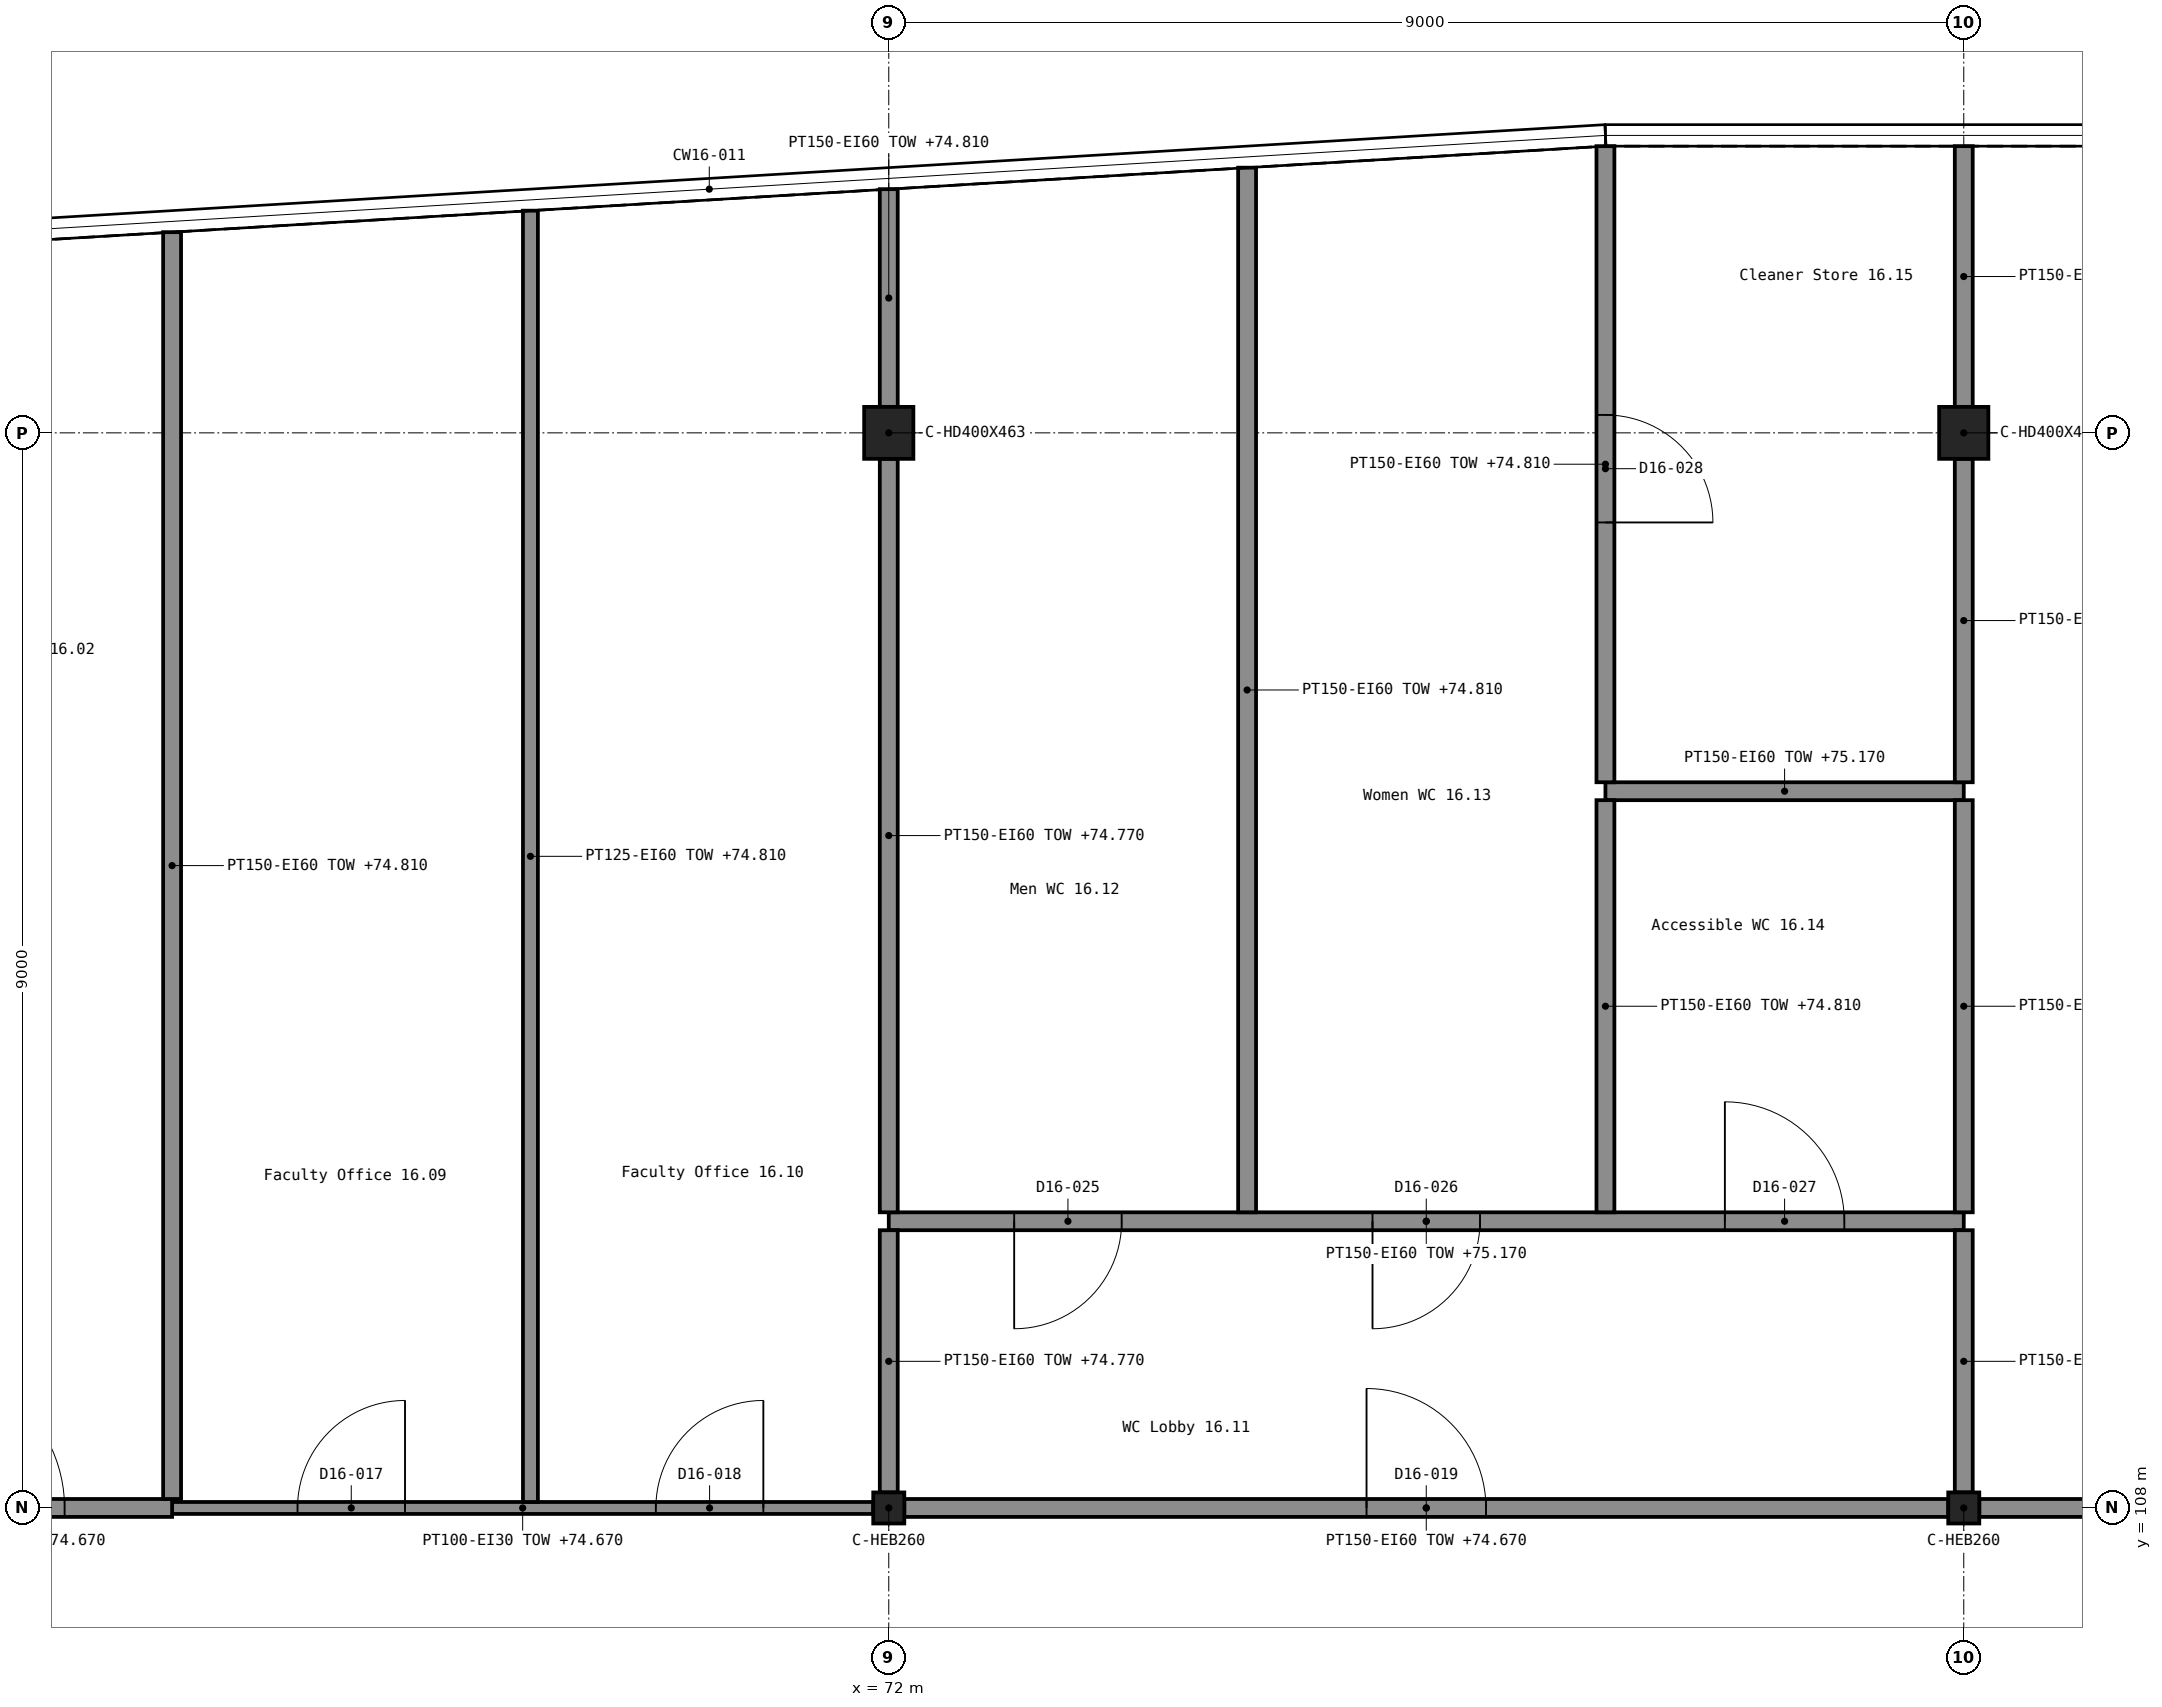
"""IFC4 building model, lengths in metres.
Left out: names, types, materials, properties, quantities, classifications, styles, units other than length and angle.
Written with IfcOpenShell. Run it as: python <this file> out.ifc"""

import sys

from ifc_helpers import new_model, si_unit, direction, frame, frame_2d, origin, origin_2d, place, context, subcontext, project, spatial, rectangle, i_section, extrude, element, fill, save


model = new_model("IFC4")
c1 = context("Model", 3, precision=1e-05, world=origin(), true_north=direction((0.0, 1.0)))
c2 = subcontext(c1, "Body", "Model", "MODEL_VIEW")
j1 = project(units=[si_unit("LENGTHUNIT", "METRE"), si_unit("PLANEANGLEUNIT", "RADIAN")], contexts=[c1])
p1 = place(None, origin())
s1 = spatial("IfcSite", under=j1, at=p1, CompositionType="ELEMENT")
p2 = place(p1, origin())
s2 = spatial("IfcBuilding", under=s1, at=p2, CompositionType="ELEMENT")
p3 = place(p2, frame((0.0, 0.0, 71.4)))
s3 = spatial("IfcBuildingStorey", under=s2, at=p3, CompositionType="ELEMENT", Elevation=71.4)
for number, where, z_axis, x_axis in (
    (1, (72.0, 108.0, 0.0), (0.0, 0.0, 1.0), (1.0, 0.0, 0.0)),
    (2, (81.0, 108.0, 0.0), (0.0, 0.0, 1.0), (1.0, 0.0, 0.0)),
):
    element("IfcColumn", number, at=place(p3, frame(where, z_axis=z_axis, x_axis=x_axis)), inside=s3, PredefinedType="COLUMN", context=c2, shape_type="SweptSolid", body=[
        extrude(i_section(OverallWidth=0.26, OverallDepth=0.26, WebThickness=0.01, FlangeThickness=0.018, FilletRadius=0.024, at=origin_2d()), origin(), (0.0, 0.0, 1.0), 3.9),
    ])
for number, where, z_axis, x_axis in (
    (3, (72.0, 117.0, 0.0), (0.0, 0.0, 1.0), (1.0, 0.0, 0.0)),
    (4, (81.0, 117.0, 0.0), (0.0, 0.0, 1.0), (1.0, 0.0, 0.0)),
):
    element("IfcColumn", number, at=place(p3, frame(where, z_axis=z_axis, x_axis=x_axis)), inside=s3, PredefinedType="COLUMN", context=c2, shape_type="SweptSolid", body=[
        extrude(i_section(OverallWidth=0.412, OverallDepth=0.435, WebThickness=0.036, FlangeThickness=0.057, FilletRadius=0.015, at=origin_2d()), origin(), (0.0, 0.0, 1.0), 3.9),
    ])
p4 = place(p3, frame((66.0, 108.0, 0.0), z_axis=(0.0, 0.0, 1.0), x_axis=(1.0, 0.0, 0.0)))
e5 = element("IfcWall", 5, at=p4, inside=s3, PredefinedType="PARTITIONING", context=c2, shape_type="SweptSolid", body=[
    extrude(rectangle(XDim=5.87, YDim=0.1, at=frame_2d((2.935, 0.0))), origin(), (0.0, 0.0, 1.0), 3.27),
])
p5 = place(p4, frame((1.05, 0.0, 0.0)))
e6 = element("IfcOpeningElement", 6, at=p5, cuts=e5, PredefinedType="OPENING", context=c2, shape_type="SweptSolid", body=[
    extrude(rectangle(XDim=0.9, YDim=2.1, at=frame_2d((0.45, 1.05))), frame((0.0, 0.061, 0.0), z_axis=(0.0, -1.0, 0.0), x_axis=(1.0, 0.0, 0.0)), (0.0, 0.0, 1.0), 0.122),
])
p6 = place(p4, frame((4.05, 0.0, 0.0)))
e7 = element("IfcOpeningElement", 7, at=p6, cuts=e5, PredefinedType="OPENING", context=c2, shape_type="SweptSolid", body=[
    extrude(rectangle(XDim=0.9, YDim=2.1, at=frame_2d((0.45, 1.05))), frame((0.0, 0.061, 0.0), z_axis=(0.0, -1.0, 0.0), x_axis=(1.0, 0.0, 0.0)), (0.0, 0.0, 1.0), 0.122),
])
p7 = place(p3, frame((63.2, 108.0, 0.0), z_axis=(0.0, 0.0, 1.0), x_axis=(1.0, 0.0, 0.0)))
e8 = element("IfcWall", 8, at=p7, inside=s3, PredefinedType="PARTITIONING", context=c2, shape_type="SweptSolid", body=[
    extrude(rectangle(XDim=2.8, YDim=0.15, at=frame_2d((1.4, 0.0))), origin(), (0.0, 0.0, 1.0), 3.27),
])
p8 = place(p7, frame((0.7, 0.0, 0.0)))
e9 = element("IfcOpeningElement", 9, at=p8, cuts=e8, PredefinedType="OPENING", context=c2, shape_type="SweptSolid", body=[
    extrude(rectangle(XDim=1.2, YDim=2.1, at=frame_2d((0.6, 1.05))), frame((0.0, 0.086, 0.0), z_axis=(0.0, -1.0, 0.0), x_axis=(1.0, 0.0, 0.0)), (0.0, 0.0, 1.0), 0.172),
])
p9 = place(p3, frame((72.13, 108.0, 0.0), z_axis=(0.0, 0.0, 1.0), x_axis=(1.0, 0.0, 0.0)))
e10 = element("IfcWall", 10, at=p9, inside=s3, PredefinedType="PARTITIONING", context=c2, shape_type="SweptSolid", body=[
    extrude(rectangle(XDim=8.74, YDim=0.15, at=frame_2d((4.37, 0.0))), origin(), (0.0, 0.0, 1.0), 3.27),
])
p10 = place(p9, frame((3.87, 0.0, 0.0)))
e11 = element("IfcOpeningElement", 11, at=p10, cuts=e10, PredefinedType="OPENING", context=c2, shape_type="SweptSolid", body=[
    extrude(rectangle(XDim=1.0, YDim=2.1, at=frame_2d((0.5, 1.05))), frame((0.0, 0.086, 0.0), z_axis=(0.0, -1.0, 0.0), x_axis=(1.0, 0.0, 0.0)), (0.0, 0.0, 1.0), 0.172),
])
p11 = place(p3, frame((81.13, 108.0, 0.0), z_axis=(0.0, 0.0, 1.0), x_axis=(1.0, 0.0, 0.0)))
e12 = element("IfcWall", 12, at=p11, inside=s3, PredefinedType="PARTITIONING", context=c2, shape_type="SweptSolid", body=[
    extrude(rectangle(XDim=8.74, YDim=0.15, at=frame_2d((4.37, 0.0))), origin(), (0.0, 0.0, 1.0), 3.27),
])
p12 = place(p11, frame((6.195, 0.0, 0.0)))
e13 = element("IfcOpeningElement", 13, at=p12, cuts=e12, PredefinedType="OPENING", context=c2, shape_type="SweptSolid", body=[
    extrude(rectangle(XDim=1.1, YDim=2.4, at=frame_2d((0.55, 1.2))), frame((0.0, 0.086, 0.0), z_axis=(0.0, -1.0, 0.0), x_axis=(1.0, 0.0, 0.0)), (0.0, 0.0, 1.0), 0.172),
])
p13 = place(p3, frame((72.0, 110.4, 0.0), z_axis=(0.0, 0.0, 1.0), x_axis=(1.0, 0.0, 0.0)))
e14 = element("IfcWall", 14, at=p13, inside=s3, PredefinedType="PARTITIONING", context=c2, shape_type="SweptSolid", body=[
    extrude(rectangle(XDim=9.0, YDim=0.15, at=frame_2d((4.5, 0.0))), origin(), (0.0, 0.0, 1.0), 3.77),
])
p14 = place(p13, frame((1.05, 0.0, 0.0)))
e15 = element("IfcOpeningElement", 15, at=p14, cuts=e14, PredefinedType="OPENING", context=c2, shape_type="SweptSolid", body=[
    extrude(rectangle(XDim=0.9, YDim=2.1, at=frame_2d((0.45, 1.05))), frame((0.0, 0.086, 0.0), z_axis=(0.0, -1.0, 0.0), x_axis=(1.0, 0.0, 0.0)), (0.0, 0.0, 1.0), 0.172),
])
p15 = place(p13, frame((4.05, 0.0, 0.0)))
e16 = element("IfcOpeningElement", 16, at=p15, cuts=e14, PredefinedType="OPENING", context=c2, shape_type="SweptSolid", body=[
    extrude(rectangle(XDim=0.9, YDim=2.1, at=frame_2d((0.45, 1.05))), frame((0.0, 0.086, 0.0), z_axis=(0.0, -1.0, 0.0), x_axis=(1.0, 0.0, 0.0)), (0.0, 0.0, 1.0), 0.172),
])
p16 = place(p13, frame((7.0, 0.0, 0.0)))
e17 = element("IfcOpeningElement", 17, at=p16, cuts=e14, PredefinedType="OPENING", context=c2, shape_type="SweptSolid", body=[
    extrude(rectangle(XDim=1.0, YDim=2.1, at=frame_2d((0.5, 1.05))), frame((0.0, 0.086, 0.0), z_axis=(0.0, -1.0, 0.0), x_axis=(1.0, 0.0, 0.0)), (0.0, 0.0, 1.0), 0.172),
])
p17 = place(p3, frame((78.0, 114.0, 0.0), z_axis=(0.0, 0.0, 1.0), x_axis=(1.0, 0.0, 0.0)))
e18 = element("IfcWall", 18, at=p17, inside=s3, PredefinedType="PARTITIONING", context=c2, shape_type="SweptSolid", body=[
    extrude(rectangle(XDim=3.0, YDim=0.15, at=frame_2d((1.5, 0.0))), origin(), (0.0, 0.0, 1.0), 3.77),
])
p18 = place(p3, frame((66.0, 108.075, 0.0), z_axis=(0.0, 0.0, 1.0), x_axis=(0.0, 1.0, 0.0)))
e19 = element("IfcWall", 19, at=p18, inside=s3, PredefinedType="PARTITIONING", context=c2, shape_type="SweptSolid", body=[
    extrude(rectangle(XDim=10.605, YDim=0.15, at=frame_2d((5.302, 0.0))), origin(), (0.0, 0.0, 1.0), 3.41),
])
p19 = place(p3, frame((69.0, 108.05, 0.0), z_axis=(0.0, 0.0, 1.0), x_axis=(0.0, 1.0, 0.0)))
e20 = element("IfcWall", 20, at=p19, inside=s3, PredefinedType="PARTITIONING", context=c2, shape_type="SweptSolid", body=[
    extrude(rectangle(XDim=10.81, YDim=0.125, at=frame_2d((5.405, 0.0))), origin(), (0.0, 0.0, 1.0), 3.41),
])
p20 = place(p3, frame((72.0, 108.13, 0.0), z_axis=(0.0, 0.0, 1.0), x_axis=(0.0, 1.0, 0.0)))
e21 = element("IfcWall", 21, at=p20, inside=s3, PredefinedType="PARTITIONING", context=c2, shape_type="SweptSolid", body=[
    extrude(rectangle(XDim=2.195, YDim=0.15, at=frame_2d((1.098, 0.0))), origin(), (0.0, 0.0, 1.0), 3.37),
])
p21 = place(p3, frame((72.0, 110.475, 0.0), z_axis=(0.0, 0.0, 1.0), x_axis=(0.0, 1.0, 0.0)))
e22 = element("IfcWall", 22, at=p21, inside=s3, PredefinedType="PARTITIONING", context=c2, shape_type="SweptSolid", body=[
    extrude(rectangle(XDim=6.307, YDim=0.15, at=frame_2d((3.154, 0.0))), origin(), (0.0, 0.0, 1.0), 3.37),
])
p22 = place(p3, frame((72.0, 117.218, 0.0), z_axis=(0.0, 0.0, 1.0), x_axis=(0.0, 1.0, 0.0)))
e23 = element("IfcWall", 23, at=p22, inside=s3, PredefinedType="PARTITIONING", context=c2, shape_type="SweptSolid", body=[
    extrude(rectangle(XDim=1.823, YDim=0.15, at=frame_2d((0.911, 0.0))), origin(), (0.0, 0.0, 1.0), 3.41),
])
p23 = place(p3, frame((75.0, 110.475, 0.0), z_axis=(0.0, 0.0, 1.0), x_axis=(0.0, 1.0, 0.0)))
e24 = element("IfcWall", 24, at=p23, inside=s3, PredefinedType="PARTITIONING", context=c2, shape_type="SweptSolid", body=[
    extrude(rectangle(XDim=8.745, YDim=0.15, at=frame_2d((4.373, 0.0))), origin(), (0.0, 0.0, 1.0), 3.41),
])
p24 = place(p3, frame((78.0, 110.475, 0.0), z_axis=(0.0, 0.0, 1.0), x_axis=(0.0, 1.0, 0.0)))
e25 = element("IfcWall", 25, at=p24, inside=s3, PredefinedType="PARTITIONING", context=c2, shape_type="SweptSolid", body=[
    extrude(rectangle(XDim=3.45, YDim=0.15, at=frame_2d((1.725, 0.0))), origin(), (0.0, 0.0, 1.0), 3.41),
])
p25 = place(p3, frame((78.0, 114.075, 0.0), z_axis=(0.0, 0.0, 1.0), x_axis=(0.0, 1.0, 0.0)))
e26 = element("IfcWall", 26, at=p25, inside=s3, PredefinedType="PARTITIONING", context=c2, shape_type="SweptSolid", body=[
    extrude(rectangle(XDim=5.325, YDim=0.15, at=frame_2d((2.663, 0.0))), origin(), (0.0, 0.0, 1.0), 3.41),
])
p26 = place(p25, frame((2.175, 0.0, 0.0)))
e27 = element("IfcOpeningElement", 27, at=p26, cuts=e26, PredefinedType="OPENING", context=c2, shape_type="SweptSolid", body=[
    extrude(rectangle(XDim=0.9, YDim=2.1, at=frame_2d((0.45, 1.05))), frame((0.0, 0.086, 0.0), z_axis=(0.0, -1.0, 0.0), x_axis=(1.0, 0.0, 0.0)), (0.0, 0.0, 1.0), 0.172),
])
p27 = place(p3, frame((81.0, 108.13, 0.0), z_axis=(0.0, 0.0, 1.0), x_axis=(0.0, 1.0, 0.0)))
e28 = element("IfcWall", 28, at=p27, inside=s3, PredefinedType="PARTITIONING", context=c2, shape_type="SweptSolid", body=[
    extrude(rectangle(XDim=2.195, YDim=0.15, at=frame_2d((1.098, 0.0))), origin(), (0.0, 0.0, 1.0), 3.37),
])
p28 = place(p3, frame((81.0, 110.475, 0.0), z_axis=(0.0, 0.0, 1.0), x_axis=(0.0, 1.0, 0.0)))
e29 = element("IfcWall", 29, at=p28, inside=s3, PredefinedType="PARTITIONING", context=c2, shape_type="SweptSolid", body=[
    extrude(rectangle(XDim=3.45, YDim=0.15, at=frame_2d((1.725, 0.0))), origin(), (0.0, 0.0, 1.0), 3.37),
])
p29 = place(p3, frame((81.0, 114.075, 0.0), z_axis=(0.0, 0.0, 1.0), x_axis=(0.0, 1.0, 0.0)))
e30 = element("IfcWall", 30, at=p29, inside=s3, PredefinedType="PARTITIONING", context=c2, shape_type="SweptSolid", body=[
    extrude(rectangle(XDim=2.708, YDim=0.15, at=frame_2d((1.354, 0.0))), origin(), (0.0, 0.0, 1.0), 3.37),
])
p30 = place(p3, frame((81.0, 117.218, 0.0), z_axis=(0.0, 0.0, 1.0), x_axis=(0.0, 1.0, 0.0)))
e31 = element("IfcWall", 31, at=p30, inside=s3, PredefinedType="PARTITIONING", context=c2, shape_type="SweptSolid", body=[
    extrude(rectangle(XDim=2.182, YDim=0.15, at=frame_2d((1.091, 0.0))), origin(), (0.0, 0.0, 1.0), 3.41),
])
p31 = place(p8, origin())
e32 = element("IfcDoor", 32, at=p31, inside=s3, OperationType="SINGLE_SWING_LEFT", PredefinedType="DOOR", context=c2, shape_type="SweptSolid", body=[
    extrude(rectangle(XDim=1.2, YDim=2.1, at=frame_2d((0.6, 1.05))), frame((0.0, 0.025, 0.0), z_axis=(0.0, -1.0, 0.0), x_axis=(1.0, 0.0, 0.0)), (0.0, 0.0, 1.0), 0.05),
])
fill(e9, e32)
p32 = place(p5, origin())
e33 = element("IfcDoor", 33, at=p32, inside=s3, OperationType="SINGLE_SWING_RIGHT", PredefinedType="DOOR", context=c2, shape_type="SweptSolid", body=[
    extrude(rectangle(XDim=0.9, YDim=2.1, at=frame_2d((0.45, 1.05))), frame((0.0, 0.025, 0.0), z_axis=(0.0, -1.0, 0.0), x_axis=(1.0, 0.0, 0.0)), (0.0, 0.0, 1.0), 0.05),
])
fill(e6, e33)
p33 = place(p6, origin())
e34 = element("IfcDoor", 34, at=p33, inside=s3, OperationType="SINGLE_SWING_RIGHT", PredefinedType="DOOR", context=c2, shape_type="SweptSolid", body=[
    extrude(rectangle(XDim=0.9, YDim=2.1, at=frame_2d((0.45, 1.05))), frame((0.0, 0.025, 0.0), z_axis=(0.0, -1.0, 0.0), x_axis=(1.0, 0.0, 0.0)), (0.0, 0.0, 1.0), 0.05),
])
fill(e7, e34)
p34 = place(p10, origin())
e35 = element("IfcDoor", 35, at=p34, inside=s3, OperationType="SINGLE_SWING_LEFT", PredefinedType="DOOR", context=c2, shape_type="SweptSolid", body=[
    extrude(rectangle(XDim=1.0, YDim=2.1, at=frame_2d((0.5, 1.05))), frame((0.0, 0.025, 0.0), z_axis=(0.0, -1.0, 0.0), x_axis=(1.0, 0.0, 0.0)), (0.0, 0.0, 1.0), 0.05),
])
fill(e11, e35)
p35 = place(p14, frame((0.9, 0.0, 0.0), z_axis=(0.0, 0.0, 1.0), x_axis=(-1.0, 0.0, 0.0)))
e36 = element("IfcDoor", 36, at=p35, inside=s3, OperationType="SINGLE_SWING_RIGHT", PredefinedType="DOOR", context=c2, shape_type="SweptSolid", body=[
    extrude(rectangle(XDim=0.9, YDim=2.1, at=frame_2d((0.45, 1.05))), frame((0.0, 0.025, 0.0), z_axis=(0.0, -1.0, 0.0), x_axis=(1.0, 0.0, 0.0)), (0.0, 0.0, 1.0), 0.05),
])
fill(e15, e36)
p36 = place(p15, frame((0.9, 0.0, 0.0), z_axis=(0.0, 0.0, 1.0), x_axis=(-1.0, 0.0, 0.0)))
e37 = element("IfcDoor", 37, at=p36, inside=s3, OperationType="SINGLE_SWING_RIGHT", PredefinedType="DOOR", context=c2, shape_type="SweptSolid", body=[
    extrude(rectangle(XDim=0.9, YDim=2.1, at=frame_2d((0.45, 1.05))), frame((0.0, 0.025, 0.0), z_axis=(0.0, -1.0, 0.0), x_axis=(1.0, 0.0, 0.0)), (0.0, 0.0, 1.0), 0.05),
])
fill(e16, e37)
p37 = place(p16, origin())
e38 = element("IfcDoor", 38, at=p37, inside=s3, OperationType="SINGLE_SWING_LEFT", PredefinedType="DOOR", context=c2, shape_type="SweptSolid", body=[
    extrude(rectangle(XDim=1.0, YDim=2.1, at=frame_2d((0.5, 1.05))), frame((0.0, 0.025, 0.0), z_axis=(0.0, -1.0, 0.0), x_axis=(1.0, 0.0, 0.0)), (0.0, 0.0, 1.0), 0.05),
])
fill(e17, e38)
p38 = place(p26, frame((0.9, 0.0, 0.0), z_axis=(0.0, 0.0, 1.0), x_axis=(-1.0, 0.0, 0.0)))
e39 = element("IfcDoor", 39, at=p38, inside=s3, OperationType="SINGLE_SWING_RIGHT", PredefinedType="DOOR", context=c2, shape_type="SweptSolid", body=[
    extrude(rectangle(XDim=0.9, YDim=2.1, at=frame_2d((0.45, 1.05))), frame((0.0, 0.025, 0.0), z_axis=(0.0, -1.0, 0.0), x_axis=(1.0, 0.0, 0.0)), (0.0, 0.0, 1.0), 0.05),
])
fill(e27, e39)
save(model, sys.argv[1])
